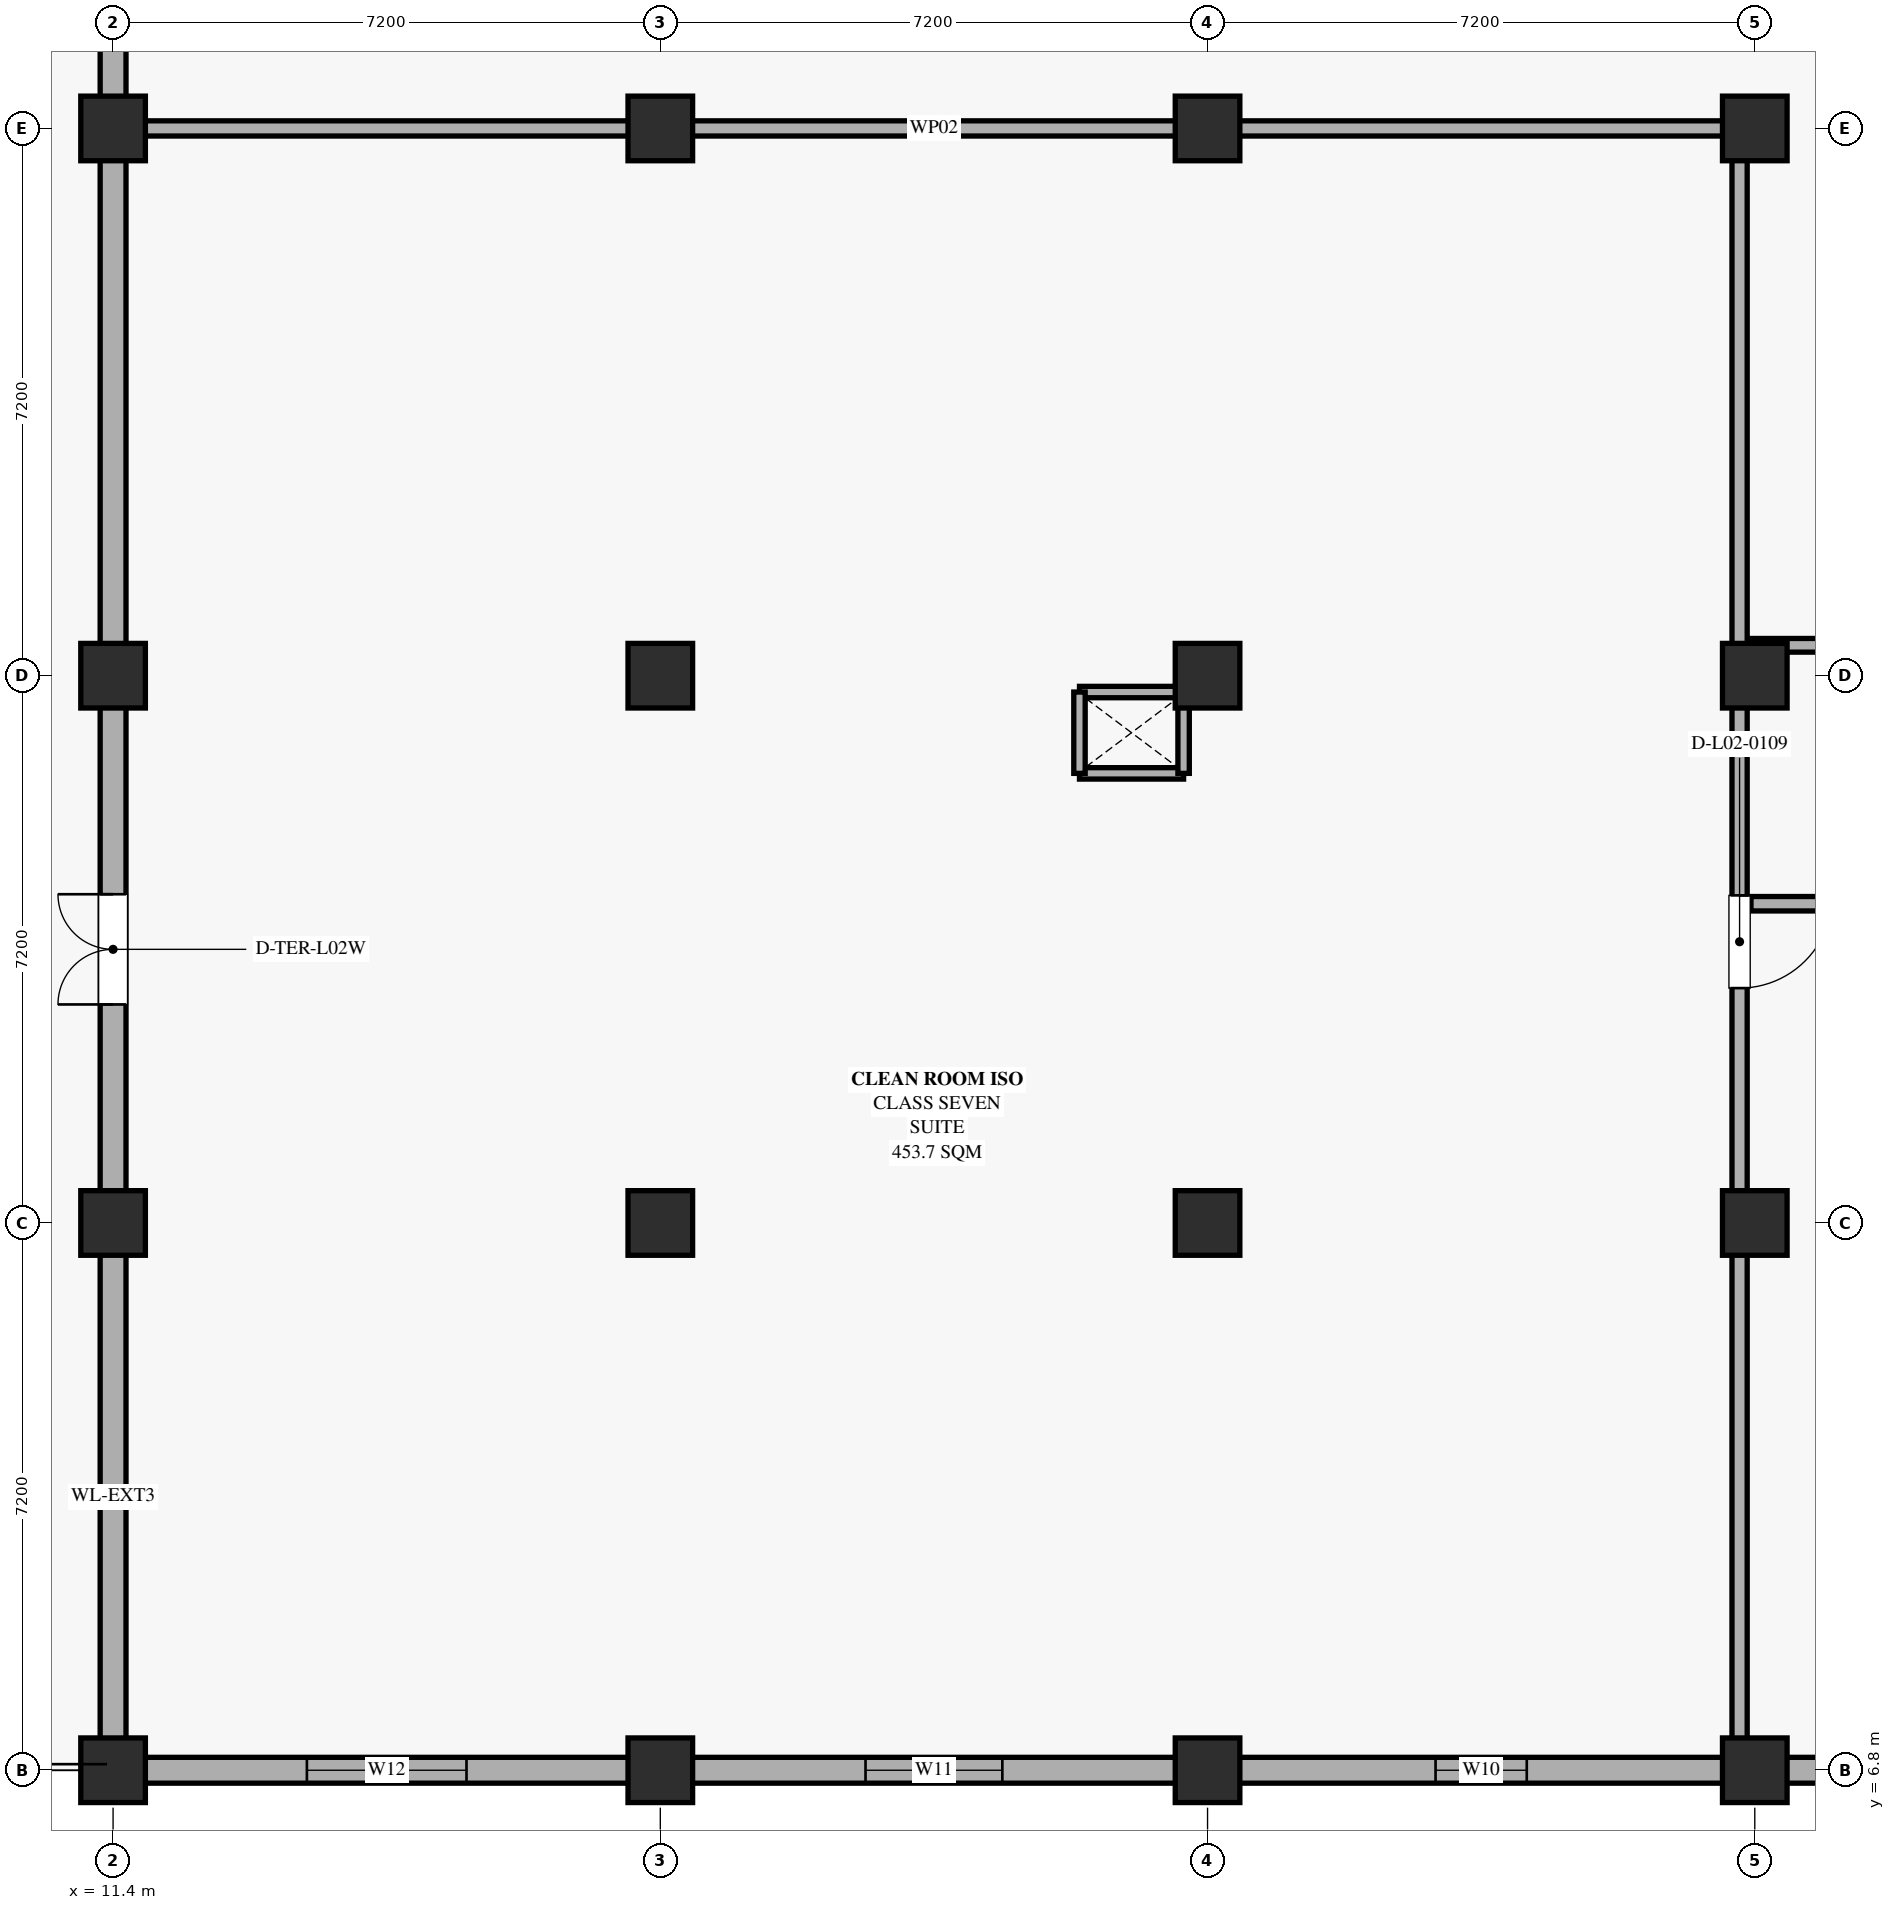
"""IFC4 building model, lengths in metres.
Left out: names, types, materials, properties, quantities, classifications, styles, units other than length and angle.
Written with IfcOpenShell. Run it as: python <this file> out.ifc"""

import sys

from ifc_helpers import new_model, si_unit, direction, frame, frame_2d, origin, origin_2d, place, context, subcontext, project, spatial, rectangle, extrude, element, fill, save


model = new_model("IFC4")
c1 = context("Model", 3, precision=1e-05, world=origin(), true_north=direction((0.0, 1.0)))
c2 = subcontext(c1, "Body", "Model", "MODEL_VIEW")
j1 = project(units=[si_unit("LENGTHUNIT", "METRE"), si_unit("PLANEANGLEUNIT", "RADIAN")], contexts=[c1])
p1 = place(None, origin())
s1 = spatial("IfcSite", under=j1, at=p1, CompositionType="ELEMENT")
p2 = place(p1, origin())
s2 = spatial("IfcBuilding", under=s1, at=p2, CompositionType="ELEMENT")
p3 = place(p2, frame((0.0, 0.0, 10.44)))
s3 = spatial("IfcBuildingStorey", under=s2, at=p3, CompositionType="ELEMENT", Elevation=10.44)
for number, where, z_axis, x_axis in (
    (1, (11.4, 6.8, 0.0), (0.0, 0.0, 1.0), (1.0, 0.0, 0.0)),
    (2, (18.6, 6.8, 0.0), (0.0, 0.0, 1.0), (1.0, 0.0, 0.0)),
    (3, (25.8, 6.8, 0.0), (0.0, 0.0, 1.0), (1.0, 0.0, 0.0)),
    (4, (33.0, 6.8, 0.0), (0.0, 0.0, 1.0), (1.0, 0.0, 0.0)),
    (5, (11.4, 14.0, 0.0), (0.0, 0.0, 1.0), (1.0, 0.0, 0.0)),
    (6, (18.6, 14.0, 0.0), (0.0, 0.0, 1.0), (1.0, 0.0, 0.0)),
    (7, (25.8, 14.0, 0.0), (0.0, 0.0, 1.0), (1.0, 0.0, 0.0)),
    (8, (33.0, 14.0, 0.0), (0.0, 0.0, 1.0), (1.0, 0.0, 0.0)),
    (9, (11.4, 21.2, 0.0), (0.0, 0.0, 1.0), (1.0, 0.0, 0.0)),
    (10, (18.6, 21.2, 0.0), (0.0, 0.0, 1.0), (1.0, 0.0, 0.0)),
    (11, (25.8, 21.2, 0.0), (0.0, 0.0, 1.0), (1.0, 0.0, 0.0)),
    (12, (33.0, 21.2, 0.0), (0.0, 0.0, 1.0), (1.0, 0.0, 0.0)),
    (13, (11.4, 28.4, 0.0), (0.0, 0.0, 1.0), (1.0, 0.0, 0.0)),
    (14, (18.6, 28.4, 0.0), (0.0, 0.0, 1.0), (1.0, 0.0, 0.0)),
    (15, (25.8, 28.4, 0.0), (0.0, 0.0, 1.0), (1.0, 0.0, 0.0)),
    (16, (33.0, 28.4, 0.0), (0.0, 0.0, 1.0), (1.0, 0.0, 0.0)),
):
    element("IfcColumn", number, at=place(p3, frame(where, z_axis=z_axis, x_axis=x_axis)), inside=s3, PredefinedType="COLUMN", context=c2, shape_type="SweptSolid", body=[
        extrude(rectangle(XDim=0.85, YDim=0.85, at=origin_2d()), origin(), (0.0, 0.0, 1.0), 4.68),
    ])
p4 = place(p3, frame((11.4, 7.21, 0.0), z_axis=(0.0, 0.0, 1.0), x_axis=(0.0, 1.0, 0.0)))
e17 = element("IfcWall", 17, at=p4, inside=s3, PredefinedType="SOLIDWALL", context=c2, shape_type="SweptSolid", body=[
    extrude(rectangle(XDim=6.38, YDim=0.34, at=frame_2d((3.19, 0.0))), origin(), (0.0, 0.0, 1.0), 3.18),
])
p5 = place(p3, frame((11.4, 14.41, 0.0), z_axis=(0.0, 0.0, 1.0), x_axis=(0.0, 1.0, 0.0)))
e18 = element("IfcWall", 18, at=p5, inside=s3, PredefinedType="SOLIDWALL", context=c2, shape_type="SweptSolid", body=[
    extrude(rectangle(XDim=6.38, YDim=0.34, at=frame_2d((3.19, 0.0))), origin(), (0.0, 0.0, 1.0), 3.18),
])
p6 = place(p5, frame((2.465, 0.0, 0.0)))
e19 = element("IfcOpeningElement", 19, at=p6, cuts=e18, PredefinedType="OPENING", context=c2, shape_type="SweptSolid", body=[
    extrude(rectangle(XDim=1.45, YDim=2.2, at=frame_2d((0.725, 1.1))), frame((0.0, 0.18, 0.0), z_axis=(0.0, -1.0, 0.0), x_axis=(1.0, 0.0, 0.0)), (0.0, 0.0, 1.0), 0.36),
])
for number, where, z_axis, x_axis in (
    (20, (11.4, 21.61, 0.0), (0.0, 0.0, 1.0), (0.0, 1.0, 0.0)),
    (21, (11.4, 28.81, 0.0), (0.0, 0.0, 1.0), (0.0, 1.0, 0.0)),
):
    element("IfcWall", number, at=place(p3, frame(where, z_axis=z_axis, x_axis=x_axis)), inside=s3, PredefinedType="SOLIDWALL", context=c2, shape_type="SweptSolid", body=[
        extrude(rectangle(XDim=6.38, YDim=0.34, at=frame_2d((3.19, 0.0))), origin(), (0.0, 0.0, 1.0), 3.18),
    ])
p7 = place(p3, frame((39.79, 6.8, 0.0), z_axis=(0.0, 0.0, 1.0), x_axis=(-1.0, 0.0, 0.0)))
e22 = element("IfcWall", 22, at=p7, inside=s3, PredefinedType="SOLIDWALL", context=c2, shape_type="SweptSolid", body=[
    extrude(rectangle(XDim=6.38, YDim=0.34, at=frame_2d((3.19, 0.0))), origin(), (0.0, 0.0, 1.0), 3.18),
])
p8 = place(p7, frame((2.44, 0.0, 0.85)))
e23 = element("IfcOpeningElement", 23, at=p8, cuts=e22, PredefinedType="OPENING", context=c2, shape_type="SweptSolid", body=[
    extrude(rectangle(XDim=1.5, YDim=2.1, at=frame_2d((0.75, 1.05))), frame((0.0, 0.18, 0.0), z_axis=(0.0, -1.0, 0.0), x_axis=(1.0, 0.0, 0.0)), (0.0, 0.0, 1.0), 0.36),
])
p9 = place(p3, frame((32.59, 6.8, 0.0), z_axis=(0.0, 0.0, 1.0), x_axis=(-1.0, 0.0, 0.0)))
e24 = element("IfcWall", 24, at=p9, inside=s3, PredefinedType="SOLIDWALL", context=c2, shape_type="SweptSolid", body=[
    extrude(rectangle(XDim=6.38, YDim=0.34, at=frame_2d((3.19, 0.0))), origin(), (0.0, 0.0, 1.0), 3.18),
])
p10 = place(p9, frame((2.59, 0.0, 0.85)))
e25 = element("IfcOpeningElement", 25, at=p10, cuts=e24, PredefinedType="OPENING", context=c2, shape_type="SweptSolid", body=[
    extrude(rectangle(XDim=1.2, YDim=2.1, at=frame_2d((0.6, 1.05))), frame((0.0, 0.18, 0.0), z_axis=(0.0, -1.0, 0.0), x_axis=(1.0, 0.0, 0.0)), (0.0, 0.0, 1.0), 0.36),
])
p11 = place(p3, frame((25.39, 6.8, 0.0), z_axis=(0.0, 0.0, 1.0), x_axis=(-1.0, 0.0, 0.0)))
e26 = element("IfcWall", 26, at=p11, inside=s3, PredefinedType="SOLIDWALL", context=c2, shape_type="SweptSolid", body=[
    extrude(rectangle(XDim=6.38, YDim=0.34, at=frame_2d((3.19, 0.0))), origin(), (0.0, 0.0, 1.0), 3.18),
])
p12 = place(p11, frame((2.29, 0.0, 0.85)))
e27 = element("IfcOpeningElement", 27, at=p12, cuts=e26, PredefinedType="OPENING", context=c2, shape_type="SweptSolid", body=[
    extrude(rectangle(XDim=1.8, YDim=1.8, at=frame_2d((0.9, 0.9))), frame((0.0, 0.18, 0.0), z_axis=(0.0, -1.0, 0.0), x_axis=(1.0, 0.0, 0.0)), (0.0, 0.0, 1.0), 0.36),
])
p13 = place(p3, frame((18.19, 6.8, 0.0), z_axis=(0.0, 0.0, 1.0), x_axis=(-1.0, 0.0, 0.0)))
e28 = element("IfcWall", 28, at=p13, inside=s3, PredefinedType="SOLIDWALL", context=c2, shape_type="SweptSolid", body=[
    extrude(rectangle(XDim=6.38, YDim=0.34, at=frame_2d((3.19, 0.0))), origin(), (0.0, 0.0, 1.0), 3.18),
])
p14 = place(p13, frame((2.14, 0.0, 0.85)))
e29 = element("IfcOpeningElement", 29, at=p14, cuts=e28, PredefinedType="OPENING", context=c2, shape_type="SweptSolid", body=[
    extrude(rectangle(XDim=2.1, YDim=1.8, at=frame_2d((1.05, 0.9))), frame((0.0, 0.18, 0.0), z_axis=(0.0, -1.0, 0.0), x_axis=(1.0, 0.0, 0.0)), (0.0, 0.0, 1.0), 0.36),
])
for number, where, z_axis, x_axis in (
    (30, (25.485, 19.915, 0.0), (0.0, 0.0, 1.0), (-1.0, 0.0, 0.0)),
    (31, (24.115, 20.985, 0.0), (0.0, 0.0, 1.0), (1.0, 0.0, 0.0)),
):
    element("IfcWall", number, at=place(p3, frame(where, z_axis=z_axis, x_axis=x_axis)), inside=s3, PredefinedType="PARTITIONING", context=c2, shape_type="SweptSolid", body=[
        extrude(rectangle(XDim=1.37, YDim=0.15, at=frame_2d((0.685, 0.0))), origin(), (0.0, 0.0, 1.0), 3.16),
    ])
for number, where, z_axis, x_axis in (
    (32, (24.115, 19.915, 0.0), (0.0, 0.0, 1.0), (0.0, 1.0, 0.0)),
    (33, (25.485, 20.985, 0.0), (0.0, 0.0, 1.0), (0.0, -1.0, 0.0)),
):
    element("IfcWall", number, at=place(p3, frame(where, z_axis=z_axis, x_axis=x_axis)), inside=s3, PredefinedType="PARTITIONING", context=c2, shape_type="SweptSolid", body=[
        extrude(rectangle(XDim=1.07, YDim=0.15, at=frame_2d((0.535, 0.0))), origin(), (0.0, 0.0, 1.0), 3.16),
    ])
p15 = place(p3, frame((11.75, 28.4, 0.0), z_axis=(0.0, 0.0, 1.0), x_axis=(1.0, 0.0, 0.0)))
e34 = element("IfcWall", 34, at=p15, inside=s3, PredefinedType="PARTITIONING", context=c2, shape_type="SweptSolid", body=[
    extrude(rectangle(XDim=20.9, YDim=0.2, at=frame_2d((10.45, 0.0))), origin(), (0.0, 0.0, 1.0), 3.16),
])
p16 = place(p3, frame((32.8, 28.25, 0.0), z_axis=(0.0, 0.0, 1.0), x_axis=(0.0, -1.0, 0.0)))
e35 = element("IfcWall", 35, at=p16, inside=s3, PredefinedType="PARTITIONING", context=c2, shape_type="SweptSolid", body=[
    extrude(rectangle(XDim=21.1, YDim=0.2, at=frame_2d((10.55, 0.0))), origin(), (0.0, 0.0, 1.0), 3.16),
])
p17 = place(p16, frame((9.94, 0.0, 0.0)))
e36 = element("IfcOpeningElement", 36, at=p17, cuts=e35, PredefinedType="OPENING", context=c2, shape_type="SweptSolid", body=[
    extrude(rectangle(XDim=1.22, YDim=2.06, at=frame_2d((0.61, 1.03))), frame((0.0, 0.11, 0.0), z_axis=(0.0, -1.0, 0.0), x_axis=(1.0, 0.0, 0.0)), (0.0, 0.0, 1.0), 0.22),
])
p18 = place(p3, frame((32.95, 18.2, 0.0), z_axis=(0.0, 0.0, 1.0), x_axis=(1.0, 0.0, 0.0)))
e37 = element("IfcWall", 37, at=p18, inside=s3, PredefinedType="PARTITIONING", context=c2, shape_type="SweptSolid", body=[
    extrude(rectangle(XDim=21.7, YDim=0.19, at=frame_2d((10.85, 0.0))), origin(), (0.0, 0.0, 1.0), 3.16),
])
p19 = place(p18, frame((10.24, 0.0, 0.0)))
e38 = element("IfcOpeningElement", 38, at=p19, cuts=e37, PredefinedType="OPENING", context=c2, shape_type="SweptSolid", body=[
    extrude(rectangle(XDim=1.22, YDim=2.12, at=frame_2d((0.61, 1.06))), frame((0.0, 0.105, 0.0), z_axis=(0.0, -1.0, 0.0), x_axis=(1.0, 0.0, 0.0)), (0.0, 0.0, 1.0), 0.21),
])
p20 = place(p3, frame((54.65, 21.6, 0.0), z_axis=(0.0, 0.0, 1.0), x_axis=(-1.0, 0.0, 0.0)))
e39 = element("IfcWall", 39, at=p20, inside=s3, PredefinedType="PARTITIONING", context=c2, shape_type="SweptSolid", body=[
    extrude(rectangle(XDim=21.7, YDim=0.18, at=frame_2d((10.85, 0.0))), origin(), (0.0, 0.0, 1.0), 3.16),
])
p21 = place(p20, frame((10.24, 0.0, 0.0)))
e40 = element("IfcOpeningElement", 40, at=p21, cuts=e39, PredefinedType="OPENING", context=c2, shape_type="SweptSolid", body=[
    extrude(rectangle(XDim=1.22, YDim=2.18, at=frame_2d((0.61, 1.09))), frame((0.0, 0.1, 0.0), z_axis=(0.0, -1.0, 0.0), x_axis=(1.0, 0.0, 0.0)), (0.0, 0.0, 1.0), 0.2),
])
p22 = place(p6, origin())
e41 = element("IfcDoor", 41, at=p22, inside=s3, OperationType="DOUBLE_DOOR_SINGLE_SWING", PredefinedType="DOOR", context=c2, shape_type="SweptSolid", body=[
    extrude(rectangle(XDim=1.45, YDim=2.2, at=frame_2d((0.725, 1.1))), frame((0.0, 0.025, 0.0), z_axis=(0.0, -1.0, 0.0), x_axis=(1.0, 0.0, 0.0)), (0.0, 0.0, 1.0), 0.05),
])
fill(e19, e41)
p23 = place(p10, origin())
e42 = element("IfcWindow", 42, at=p23, inside=s3, PartitioningType="SINGLE_PANEL", PredefinedType="WINDOW", context=c2, shape_type="SweptSolid", body=[
    extrude(rectangle(XDim=1.2, YDim=2.1, at=frame_2d((0.6, 1.05))), frame((0.0, 0.03, 0.0), z_axis=(0.0, -1.0, 0.0), x_axis=(1.0, 0.0, 0.0)), (0.0, 0.0, 1.0), 0.06),
])
fill(e25, e42)
p24 = place(p12, origin())
e43 = element("IfcWindow", 43, at=p24, inside=s3, PartitioningType="DOUBLE_PANEL_VERTICAL", PredefinedType="WINDOW", context=c2, shape_type="SweptSolid", body=[
    extrude(rectangle(XDim=1.8, YDim=1.8, at=frame_2d((0.9, 0.9))), frame((0.0, 0.03, 0.0), z_axis=(0.0, -1.0, 0.0), x_axis=(1.0, 0.0, 0.0)), (0.0, 0.0, 1.0), 0.06),
])
fill(e27, e43)
p25 = place(p14, origin())
e44 = element("IfcWindow", 44, at=p25, inside=s3, PartitioningType="DOUBLE_PANEL_VERTICAL", PredefinedType="WINDOW", context=c2, shape_type="SweptSolid", body=[
    extrude(rectangle(XDim=2.1, YDim=1.8, at=frame_2d((1.05, 0.9))), frame((0.0, 0.03, 0.0), z_axis=(0.0, -1.0, 0.0), x_axis=(1.0, 0.0, 0.0)), (0.0, 0.0, 1.0), 0.06),
])
fill(e29, e44)
p26 = place(p17, origin())
e45 = element("IfcDoor", 45, at=p26, inside=s3, OperationType="SINGLE_SWING_LEFT", PredefinedType="DOOR", context=c2, shape_type="SweptSolid", body=[
    extrude(rectangle(XDim=1.22, YDim=2.06, at=frame_2d((0.61, 1.03))), frame((0.0, 0.025, 0.0), z_axis=(0.0, -1.0, 0.0), x_axis=(1.0, 0.0, 0.0)), (0.0, 0.0, 1.0), 0.05),
])
fill(e36, e45)
save(model, sys.argv[1])
